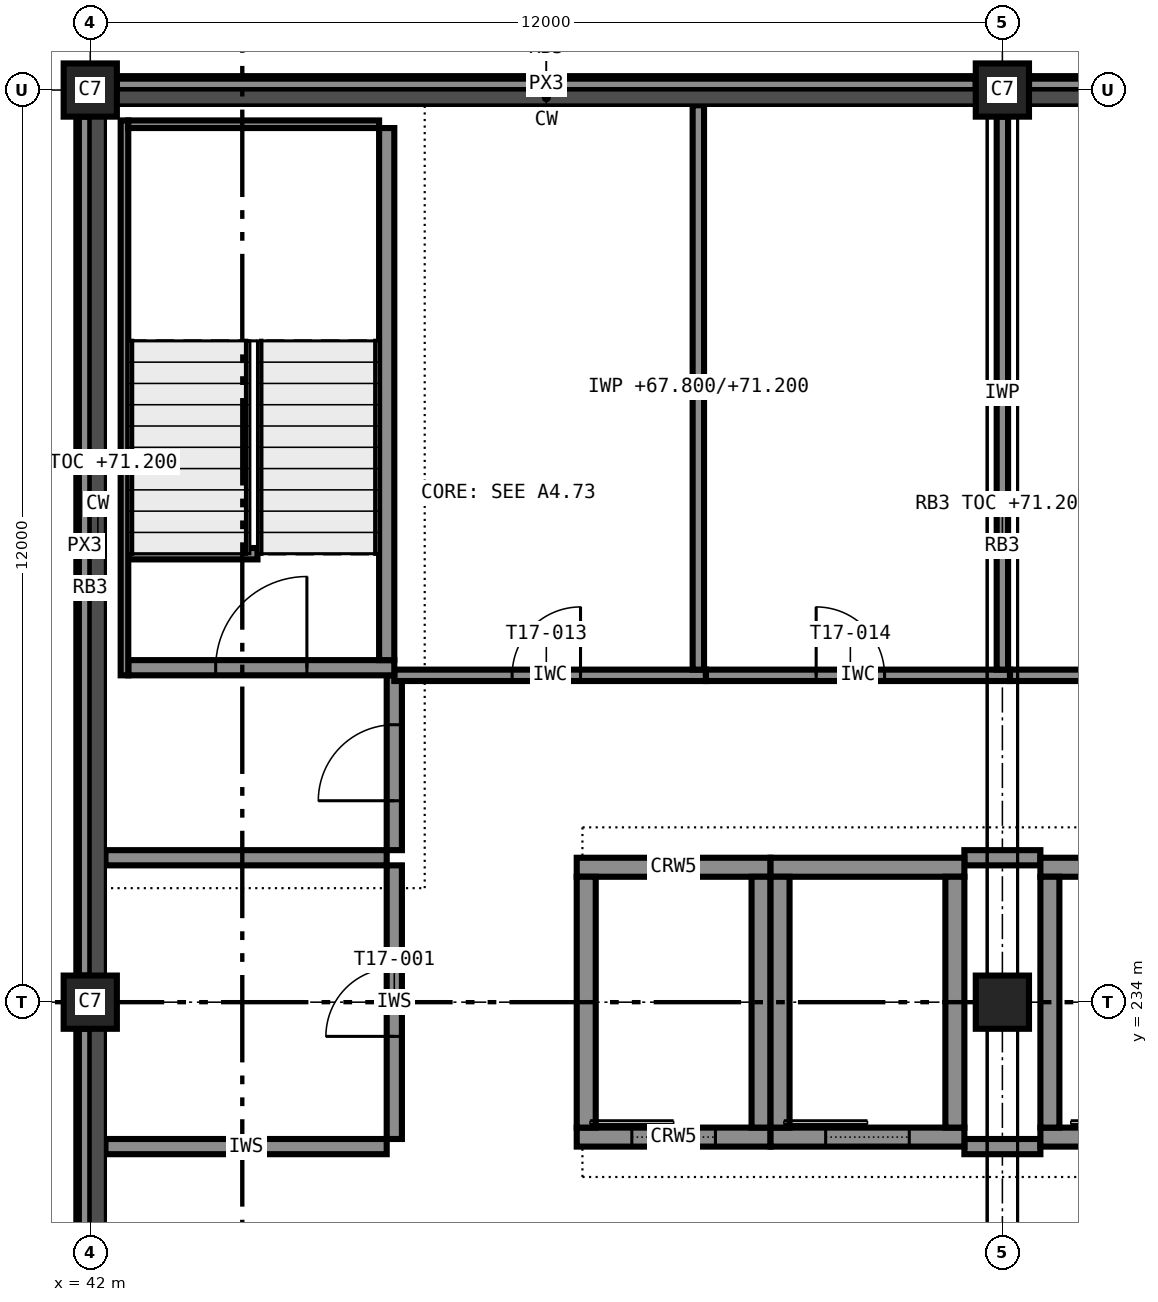
"""IFC4 building model, lengths in metres.
Left out: names, types, materials, properties, quantities, classifications, styles, units other than length and angle.
Written with IfcOpenShell. Run it as: python <this file> out.ifc"""

import sys

from ifc_helpers import new_model, si_unit, direction, frame, frame_2d, origin, origin_2d, place, context, subcontext, project, spatial, rectangle, extrude, element, fill, save


model = new_model("IFC4")
c1 = context("Model", 3, precision=1e-05, world=origin(), true_north=direction((0.0, 1.0)))
c2 = subcontext(c1, "Body", "Model", "MODEL_VIEW")
j1 = project(units=[si_unit("LENGTHUNIT", "METRE"), si_unit("PLANEANGLEUNIT", "RADIAN")], contexts=[c1])
p1 = place(None, origin())
s1 = spatial("IfcSite", under=j1, at=p1, CompositionType="ELEMENT")
p2 = place(p1, origin())
s2 = spatial("IfcBuilding", under=s1, at=p2, CompositionType="ELEMENT")
p3 = place(p2, frame((0.0, 0.0, 67.8)))
s3 = spatial("IfcBuildingStorey", under=s2, at=p3, CompositionType="ELEMENT", Elevation=67.8)
for number, where, z_axis, x_axis in (
    (1, (42.0, 234.0, 0.0), (0.0, 0.0, 1.0), (1.0, 0.0, 0.0)),
    (2, (42.0, 246.0, 0.0), (0.0, 0.0, 1.0), (1.0, 0.0, 0.0)),
    (3, (54.0, 234.0, 0.0), (0.0, 0.0, 1.0), (1.0, 0.0, 0.0)),
    (4, (54.0, 246.0, 0.0), (0.0, 0.0, 1.0), (1.0, 0.0, 0.0)),
):
    element("IfcColumn", number, at=place(p3, frame(where, z_axis=z_axis, x_axis=x_axis)), inside=s3, PredefinedType="COLUMN", context=c2, shape_type="SweptSolid", body=[
        extrude(rectangle(XDim=0.7, YDim=0.7, at=origin_2d()), origin(), (0.0, 0.0, 1.0), 3.6),
    ])
p4 = place(p3, frame((54.5, 232.225, 0.0), z_axis=(0.0, 0.0, 1.0), x_axis=(1.0, 0.0, 0.0)))
e5 = element("IfcWall", 5, at=p4, inside=s3, PredefinedType="SHEAR", context=c2, shape_type="SweptSolid", body=[
    extrude(rectangle(XDim=3.0, YDim=0.25, at=frame_2d((1.5, 0.0))), origin(), (0.0, 0.0, 1.0), 3.6),
])
p5 = place(p4, frame((0.95, 0.0, 0.0)))
e6 = element("IfcOpeningElement", 6, at=p5, cuts=e5, PredefinedType="OPENING", context=c2, shape_type="SweptSolid", body=[
    extrude(rectangle(XDim=1.1, YDim=2.1, at=frame_2d((0.55, 1.05))), frame((0.0, 0.135, 0.0), z_axis=(0.0, -1.0, 0.0), x_axis=(1.0, 0.0, 0.0)), (0.0, 0.0, 1.0), 0.27),
])
p6 = place(p3, frame((54.5, 235.775, 0.0), z_axis=(0.0, 0.0, 1.0), x_axis=(1.0, 0.0, 0.0)))
e7 = element("IfcWall", 7, at=p6, inside=s3, PredefinedType="SHEAR", context=c2, shape_type="SweptSolid", body=[
    extrude(rectangle(XDim=3.0, YDim=0.25, at=frame_2d((1.5, 0.0))), origin(), (0.0, 0.0, 1.0), 3.6),
])
p7 = place(p3, frame((54.625, 232.35, 0.0), z_axis=(0.0, 0.0, 1.0), x_axis=(0.0, 1.0, 0.0)))
e8 = element("IfcWall", 8, at=p7, inside=s3, PredefinedType="SHEAR", context=c2, shape_type="SweptSolid", body=[
    extrude(rectangle(XDim=3.3, YDim=0.25, at=frame_2d((1.65, 0.0))), origin(), (0.0, 0.0, 1.0), 3.6),
])
p8 = place(p3, frame((48.4, 232.225, 0.0), z_axis=(0.0, 0.0, 1.0), x_axis=(1.0, 0.0, 0.0)))
e9 = element("IfcWall", 9, at=p8, inside=s3, PredefinedType="SHEAR", context=c2, shape_type="SweptSolid", body=[
    extrude(rectangle(XDim=2.55, YDim=0.25, at=frame_2d((1.275, 0.0))), origin(), (0.0, 0.0, 1.0), 3.6),
])
p9 = place(p8, frame((0.725, 0.0, 0.0)))
e10 = element("IfcOpeningElement", 10, at=p9, cuts=e9, PredefinedType="OPENING", context=c2, shape_type="SweptSolid", body=[
    extrude(rectangle(XDim=1.1, YDim=2.1, at=frame_2d((0.55, 1.05))), frame((0.0, 0.135, 0.0), z_axis=(0.0, -1.0, 0.0), x_axis=(1.0, 0.0, 0.0)), (0.0, 0.0, 1.0), 0.27),
])
p10 = place(p3, frame((48.4, 235.775, 0.0), z_axis=(0.0, 0.0, 1.0), x_axis=(1.0, 0.0, 0.0)))
e11 = element("IfcWall", 11, at=p10, inside=s3, PredefinedType="SHEAR", context=c2, shape_type="SweptSolid", body=[
    extrude(rectangle(XDim=2.55, YDim=0.25, at=frame_2d((1.275, 0.0))), origin(), (0.0, 0.0, 1.0), 3.6),
])
for number, where, z_axis, x_axis in (
    (12, (48.525, 232.35, 0.0), (0.0, 0.0, 1.0), (0.0, 1.0, 0.0)),
    (13, (50.825, 232.35, 0.0), (0.0, 0.0, 1.0), (0.0, 1.0, 0.0)),
):
    element("IfcWall", number, at=place(p3, frame(where, z_axis=z_axis, x_axis=x_axis)), inside=s3, PredefinedType="SHEAR", context=c2, shape_type="SweptSolid", body=[
        extrude(rectangle(XDim=3.3, YDim=0.25, at=frame_2d((1.65, 0.0))), origin(), (0.0, 0.0, 1.0), 3.6),
    ])
p11 = place(p3, frame((50.95, 232.225, 0.0), z_axis=(0.0, 0.0, 1.0), x_axis=(1.0, 0.0, 0.0)))
e14 = element("IfcWall", 14, at=p11, inside=s3, PredefinedType="SHEAR", context=c2, shape_type="SweptSolid", body=[
    extrude(rectangle(XDim=2.55, YDim=0.25, at=frame_2d((1.275, 0.0))), origin(), (0.0, 0.0, 1.0), 3.6),
])
p12 = place(p11, frame((0.725, 0.0, 0.0)))
e15 = element("IfcOpeningElement", 15, at=p12, cuts=e14, PredefinedType="OPENING", context=c2, shape_type="SweptSolid", body=[
    extrude(rectangle(XDim=1.1, YDim=2.1, at=frame_2d((0.55, 1.05))), frame((0.0, 0.135, 0.0), z_axis=(0.0, -1.0, 0.0), x_axis=(1.0, 0.0, 0.0)), (0.0, 0.0, 1.0), 0.27),
])
p13 = place(p3, frame((50.95, 235.775, 0.0), z_axis=(0.0, 0.0, 1.0), x_axis=(1.0, 0.0, 0.0)))
e16 = element("IfcWall", 16, at=p13, inside=s3, PredefinedType="SHEAR", context=c2, shape_type="SweptSolid", body=[
    extrude(rectangle(XDim=2.55, YDim=0.25, at=frame_2d((1.275, 0.0))), origin(), (0.0, 0.0, 1.0), 3.6),
])
for number, where, z_axis, x_axis in (
    (17, (51.075, 232.35, 0.0), (0.0, 0.0, 1.0), (0.0, 1.0, 0.0)),
    (18, (53.375, 232.35, 0.0), (0.0, 0.0, 1.0), (0.0, 1.0, 0.0)),
):
    element("IfcWall", number, at=place(p3, frame(where, z_axis=z_axis, x_axis=x_axis)), inside=s3, PredefinedType="SHEAR", context=c2, shape_type="SweptSolid", body=[
        extrude(rectangle(XDim=3.3, YDim=0.25, at=frame_2d((1.65, 0.0))), origin(), (0.0, 0.0, 1.0), 3.6),
    ])
p14 = place(p3, frame((42.5, 238.4, 0.0), z_axis=(0.0, 0.0, 1.0), x_axis=(1.0, 0.0, 0.0)))
e19 = element("IfcWall", 19, at=p14, inside=s3, PredefinedType="SHEAR", context=c2, shape_type="SweptSolid", body=[
    extrude(rectangle(XDim=3.5, YDim=0.2, at=frame_2d((1.75, 0.0))), origin(), (0.0, 0.0, 1.0), 3.6),
])
p15 = place(p14, frame((1.15, 0.0, 0.0)))
e20 = element("IfcOpeningElement", 20, at=p15, cuts=e19, PredefinedType="OPENING", context=c2, shape_type="SweptSolid", body=[
    extrude(rectangle(XDim=1.2, YDim=2.1, at=frame_2d((0.6, 1.05))), frame((0.0, 0.11, 0.0), z_axis=(0.0, -1.0, 0.0), x_axis=(1.0, 0.0, 0.0)), (0.0, 0.0, 1.0), 0.22),
])
p16 = place(p3, frame((45.9, 238.5, 0.0), z_axis=(0.0, 0.0, 1.0), x_axis=(0.0, 1.0, 0.0)))
e21 = element("IfcWall", 21, at=p16, inside=s3, PredefinedType="SHEAR", context=c2, shape_type="SweptSolid", body=[
    extrude(rectangle(XDim=7.0, YDim=0.2, at=frame_2d((3.5, 0.0))), origin(), (0.0, 0.0, 1.0), 3.6),
])
p17 = place(p3, frame((42.45, 238.3, 0.0), z_axis=(0.0, 0.0, 1.0), x_axis=(0.0, 1.0, 0.0)))
e22 = element("IfcWall", 22, at=p17, inside=s3, PredefinedType="SHEAR", context=c2, shape_type="SweptSolid", body=[
    extrude(rectangle(XDim=7.3, YDim=0.1, at=frame_2d((3.65, 0.0))), origin(), (0.0, 0.0, 1.0), 3.4),
])
p18 = place(p3, frame((42.5, 245.55, 0.0), z_axis=(0.0, 0.0, 1.0), x_axis=(1.0, 0.0, 0.0)))
e23 = element("IfcWall", 23, at=p18, inside=s3, PredefinedType="SHEAR", context=c2, shape_type="SweptSolid", body=[
    extrude(rectangle(XDim=3.3, YDim=0.1, at=frame_2d((1.65, 0.0))), origin(), (0.0, 0.0, 1.0), 3.4),
])
for number, where, z_axis, x_axis in (
    (24, (65.65, 246.075, 3.4), (0.0, 0.0, 1.0), (-1.0, 0.0, 0.0)),
    (25, (53.65, 246.075, 3.4), (0.0, 0.0, 1.0), (-1.0, 0.0, 0.0)),
    (26, (41.925, 245.65, 3.4), (0.0, 0.0, 1.0), (0.0, -1.0, 0.0)),
    (27, (41.925, 233.65, 3.4), (0.0, 0.0, 1.0), (0.0, -1.0, 0.0)),
):
    element("IfcWall", number, at=place(p3, frame(where, z_axis=z_axis, x_axis=x_axis)), inside=s3, PredefinedType="STANDARD", context=c2, shape_type="SweptSolid", body=[
        extrude(rectangle(XDim=11.3, YDim=0.15, at=frame_2d((5.65, 0.0))), origin(), (0.0, 0.0, 1.0), 0.2),
    ])
p19 = place(p3, frame((42.2, 232.1, 0.0), z_axis=(0.0, 0.0, 1.0), x_axis=(1.0, 0.0, 0.0)))
e28 = element("IfcWall", 28, at=p19, inside=s3, PredefinedType="PARTITIONING", context=c2, shape_type="SweptSolid", body=[
    extrude(rectangle(XDim=3.7, YDim=0.2, at=frame_2d((1.85, 0.0))), origin(), (0.0, 0.0, 1.0), 3.4),
])
p20 = place(p3, frame((53.5, 232.1, 0.0), z_axis=(0.0, 0.0, 1.0), x_axis=(1.0, 0.0, 0.0)))
e29 = element("IfcWall", 29, at=p20, inside=s3, PredefinedType="PARTITIONING", context=c2, shape_type="SweptSolid", body=[
    extrude(rectangle(XDim=1.0, YDim=0.2, at=frame_2d((0.5, 0.0))), origin(), (0.0, 0.0, 1.0), 3.4),
])
p21 = place(p3, frame((42.2, 235.9, 0.0), z_axis=(0.0, 0.0, 1.0), x_axis=(1.0, 0.0, 0.0)))
e30 = element("IfcWall", 30, at=p21, inside=s3, PredefinedType="PARTITIONING", context=c2, shape_type="SweptSolid", body=[
    extrude(rectangle(XDim=3.7, YDim=0.2, at=frame_2d((1.85, 0.0))), origin(), (0.0, 0.0, 1.0), 3.4),
])
p22 = place(p3, frame((53.5, 235.9, 0.0), z_axis=(0.0, 0.0, 1.0), x_axis=(1.0, 0.0, 0.0)))
e31 = element("IfcWall", 31, at=p22, inside=s3, PredefinedType="PARTITIONING", context=c2, shape_type="SweptSolid", body=[
    extrude(rectangle(XDim=1.0, YDim=0.2, at=frame_2d((0.5, 0.0))), origin(), (0.0, 0.0, 1.0), 3.4),
])
p23 = place(p3, frame((46.0, 232.2, 0.0), z_axis=(0.0, 0.0, 1.0), x_axis=(0.0, 1.0, 0.0)))
e32 = element("IfcWall", 32, at=p23, inside=s3, PredefinedType="PARTITIONING", context=c2, shape_type="SweptSolid", body=[
    extrude(rectangle(XDim=3.6, YDim=0.2, at=frame_2d((1.8, 0.0))), origin(), (0.0, 0.0, 1.0), 3.4),
])
p24 = place(p23, frame((1.35, 0.0, 0.0)))
e33 = element("IfcOpeningElement", 33, at=p24, cuts=e32, PredefinedType="OPENING", context=c2, shape_type="SweptSolid", body=[
    extrude(rectangle(XDim=0.9, YDim=2.1, at=frame_2d((0.45, 1.05))), frame((0.0, 0.11, 0.0), z_axis=(0.0, -1.0, 0.0), x_axis=(1.0, 0.0, 0.0)), (0.0, 0.0, 1.0), 0.22),
])
p25 = place(p3, frame((46.0, 236.0, 0.0), z_axis=(0.0, 0.0, 1.0), x_axis=(0.0, 1.0, 0.0)))
e34 = element("IfcWall", 34, at=p25, inside=s3, PredefinedType="PARTITIONING", context=c2, shape_type="SweptSolid", body=[
    extrude(rectangle(XDim=2.3, YDim=0.2, at=frame_2d((1.15, 0.0))), origin(), (0.0, 0.0, 1.0), 3.4),
])
p26 = place(p25, frame((0.65, 0.0, 0.0)))
e35 = element("IfcOpeningElement", 35, at=p26, cuts=e34, PredefinedType="OPENING", context=c2, shape_type="SweptSolid", body=[
    extrude(rectangle(XDim=1.0, YDim=2.1, at=frame_2d((0.5, 1.05))), frame((0.0, 0.11, 0.0), z_axis=(0.0, -1.0, 0.0), x_axis=(1.0, 0.0, 0.0)), (0.0, 0.0, 1.0), 0.22),
])
p27 = place(p3, frame((46.0, 238.3, 0.0), z_axis=(0.0, 0.0, 1.0), x_axis=(1.0, 0.0, 0.0)))
e36 = element("IfcWall", 36, at=p27, inside=s3, PredefinedType="PARTITIONING", context=c2, shape_type="SweptSolid", body=[
    extrude(rectangle(XDim=4.1, YDim=0.15, at=frame_2d((2.05, 0.0))), origin(), (0.0, 0.0, 1.0), 3.4),
])
p28 = place(p27, frame((1.55, 0.0, 0.0)))
e37 = element("IfcOpeningElement", 37, at=p28, cuts=e36, PredefinedType="OPENING", context=c2, shape_type="SweptSolid", body=[
    extrude(rectangle(XDim=0.9, YDim=2.1, at=frame_2d((0.45, 1.05))), frame((0.0, 0.085, 0.0), z_axis=(0.0, -1.0, 0.0), x_axis=(1.0, 0.0, 0.0)), (0.0, 0.0, 1.0), 0.17),
])
p29 = place(p3, frame((50.1, 238.3, 0.0), z_axis=(0.0, 0.0, 1.0), x_axis=(1.0, 0.0, 0.0)))
e38 = element("IfcWall", 38, at=p29, inside=s3, PredefinedType="PARTITIONING", context=c2, shape_type="SweptSolid", body=[
    extrude(rectangle(XDim=4.0, YDim=0.15, at=frame_2d((2.0, 0.0))), origin(), (0.0, 0.0, 1.0), 3.4),
])
p30 = place(p29, frame((1.45, 0.0, 0.0)))
e39 = element("IfcOpeningElement", 39, at=p30, cuts=e38, PredefinedType="OPENING", context=c2, shape_type="SweptSolid", body=[
    extrude(rectangle(XDim=0.9, YDim=2.1, at=frame_2d((0.45, 1.05))), frame((0.0, 0.085, 0.0), z_axis=(0.0, -1.0, 0.0), x_axis=(1.0, 0.0, 0.0)), (0.0, 0.0, 1.0), 0.17),
])
p31 = place(p3, frame((50.0, 245.8, 0.0), z_axis=(0.0, 0.0, 1.0), x_axis=(0.0, -1.0, 0.0)))
e40 = element("IfcWall", 40, at=p31, inside=s3, PredefinedType="PARTITIONING", context=c2, shape_type="SweptSolid", body=[
    extrude(rectangle(XDim=7.425, YDim=0.15, at=frame_2d((3.712, 0.0))), origin(), (0.0, 0.0, 1.0), 3.4),
])
p32 = place(p3, frame((54.1, 238.3, 0.0), z_axis=(0.0, 0.0, 1.0), x_axis=(1.0, 0.0, 0.0)))
e41 = element("IfcWall", 41, at=p32, inside=s3, PredefinedType="PARTITIONING", context=c2, shape_type="SweptSolid", body=[
    extrude(rectangle(XDim=24.0, YDim=0.15, at=frame_2d((12.0, 0.0))), origin(), (0.0, 0.0, 1.0), 3.4),
])
p33 = place(p32, frame((3.4, 0.0, 0.0)))
e42 = element("IfcOpeningElement", 42, at=p33, cuts=e41, PredefinedType="OPENING", context=c2, shape_type="SweptSolid", body=[
    extrude(rectangle(XDim=1.0, YDim=2.1, at=frame_2d((0.5, 1.05))), frame((0.0, 0.085, 0.0), z_axis=(0.0, -1.0, 0.0), x_axis=(1.0, 0.0, 0.0)), (0.0, 0.0, 1.0), 0.17),
])
p34 = place(p32, frame((19.4, 0.0, 0.0)))
e43 = element("IfcOpeningElement", 43, at=p34, cuts=e41, PredefinedType="OPENING", context=c2, shape_type="SweptSolid", body=[
    extrude(rectangle(XDim=1.0, YDim=2.1, at=frame_2d((0.5, 1.05))), frame((0.0, 0.085, 0.0), z_axis=(0.0, -1.0, 0.0), x_axis=(1.0, 0.0, 0.0)), (0.0, 0.0, 1.0), 0.17),
])
p35 = place(p3, frame((54.0, 245.65, 0.0), z_axis=(0.0, 0.0, 1.0), x_axis=(0.0, -1.0, 0.0)))
e44 = element("IfcWall", 44, at=p35, inside=s3, PredefinedType="PARTITIONING", context=c2, shape_type="SweptSolid", body=[
    extrude(rectangle(XDim=7.275, YDim=0.15, at=frame_2d((3.637, 0.0))), origin(), (0.0, 0.0, 1.0), 2.6),
])
p36 = place(p3, frame((42.5, 239.9, 3.6), z_axis=(0.0, 0.0, 1.0), x_axis=(1.0, 0.0, 0.0)))
e45 = element("IfcWall", 45, at=p36, inside=s3, PredefinedType="SOLIDWALL", context=c2, shape_type="SweptSolid", body=[
    extrude(rectangle(XDim=1.7, YDim=0.15, at=frame_2d((0.85, 0.0))), origin(), (0.0, 0.0, 1.0), 1.1),
])
p37 = place(p24, origin())
e46 = element("IfcDoor", 46, at=p37, inside=s3, OperationType="SINGLE_SWING_LEFT", PredefinedType="DOOR", context=c2, shape_type="SweptSolid", body=[
    extrude(rectangle(XDim=0.9, YDim=2.1, at=frame_2d((0.45, 1.05))), frame((0.0, 0.025, 0.0), z_axis=(0.0, -1.0, 0.0), x_axis=(1.0, 0.0, 0.0)), (0.0, 0.0, 1.0), 0.05),
])
fill(e33, e46)
p38 = place(p26, origin())
e47 = element("IfcDoor", 47, at=p38, inside=s3, OperationType="SINGLE_SWING_LEFT", PredefinedType="DOOR", context=c2, shape_type="SweptSolid", body=[
    extrude(rectangle(XDim=1.0, YDim=2.1, at=frame_2d((0.5, 1.05))), frame((0.0, 0.025, 0.0), z_axis=(0.0, -1.0, 0.0), x_axis=(1.0, 0.0, 0.0)), (0.0, 0.0, 1.0), 0.05),
])
fill(e35, e47)
p39 = place(p28, origin())
e48 = element("IfcDoor", 48, at=p39, inside=s3, OperationType="SINGLE_SWING_RIGHT", PredefinedType="DOOR", context=c2, shape_type="SweptSolid", body=[
    extrude(rectangle(XDim=0.9, YDim=2.1, at=frame_2d((0.45, 1.05))), frame((0.0, 0.025, 0.0), z_axis=(0.0, -1.0, 0.0), x_axis=(1.0, 0.0, 0.0)), (0.0, 0.0, 1.0), 0.05),
])
fill(e37, e48)
p40 = place(p30, origin())
e49 = element("IfcDoor", 49, at=p40, inside=s3, OperationType="SINGLE_SWING_LEFT", PredefinedType="DOOR", context=c2, shape_type="SweptSolid", body=[
    extrude(rectangle(XDim=0.9, YDim=2.1, at=frame_2d((0.45, 1.05))), frame((0.0, 0.025, 0.0), z_axis=(0.0, -1.0, 0.0), x_axis=(1.0, 0.0, 0.0)), (0.0, 0.0, 1.0), 0.05),
])
fill(e39, e49)
p41 = place(p9, origin())
e50 = element("IfcDoor", 50, at=p41, inside=s3, OperationType="SLIDING_TO_LEFT", PredefinedType="DOOR", context=c2, shape_type="SweptSolid", body=[
    extrude(rectangle(XDim=1.1, YDim=2.1, at=frame_2d((0.55, 1.05))), frame((0.0, 0.025, 0.0), z_axis=(0.0, -1.0, 0.0), x_axis=(1.0, 0.0, 0.0)), (0.0, 0.0, 1.0), 0.05),
])
fill(e10, e50)
p42 = place(p12, origin())
e51 = element("IfcDoor", 51, at=p42, inside=s3, OperationType="SLIDING_TO_LEFT", PredefinedType="DOOR", context=c2, shape_type="SweptSolid", body=[
    extrude(rectangle(XDim=1.1, YDim=2.1, at=frame_2d((0.55, 1.05))), frame((0.0, 0.025, 0.0), z_axis=(0.0, -1.0, 0.0), x_axis=(1.0, 0.0, 0.0)), (0.0, 0.0, 1.0), 0.05),
])
fill(e15, e51)
p43 = place(p15, origin())
e52 = element("IfcDoor", 52, at=p43, inside=s3, OperationType="SINGLE_SWING_RIGHT", PredefinedType="DOOR", context=c2, shape_type="SweptSolid", body=[
    extrude(rectangle(XDim=1.2, YDim=2.1, at=frame_2d((0.6, 1.05))), frame((0.0, 0.025, 0.0), z_axis=(0.0, -1.0, 0.0), x_axis=(1.0, 0.0, 0.0)), (0.0, 0.0, 1.0), 0.05),
])
fill(e20, e52)
save(model, sys.argv[1])
